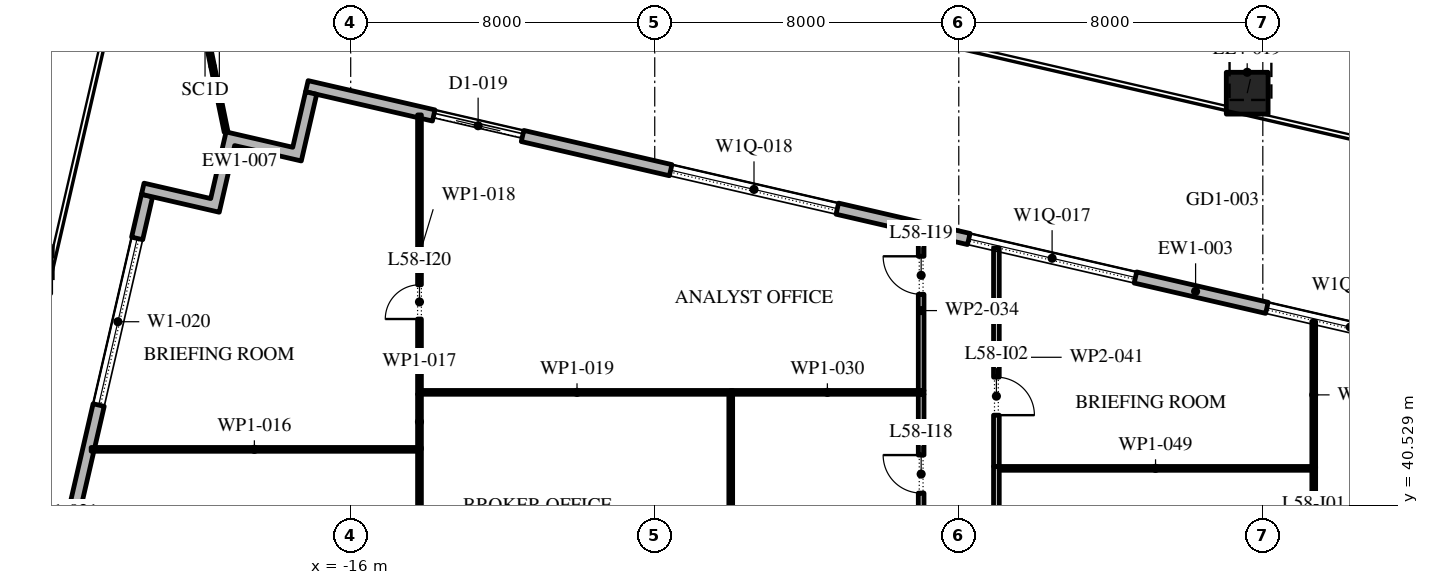
"""IFC4 building model, lengths in metres.
Left out: names, types, materials, properties, quantities, classifications, styles, units other than length and angle.
Written with IfcOpenShell. Run it as: python <this file> out.ifc"""

import sys

from ifc_helpers import new_model, si_unit, direction, frame, frame_2d, origin, origin_2d, place, context, subcontext, project, spatial, polyline, rectangle, outline, extrude, element, fill, save


model = new_model("IFC4")
c1 = context("Model", 3, precision=1e-05, world=origin(), true_north=direction((0.0, 1.0)))
c2 = subcontext(c1, "Body", "Model", "MODEL_VIEW")
j1 = project(units=[si_unit("LENGTHUNIT", "METRE"), si_unit("PLANEANGLEUNIT", "RADIAN")], contexts=[c1])
p1 = place(None, origin())
s1 = spatial("IfcSite", under=j1, at=p1, CompositionType="ELEMENT")
p2 = place(p1, origin())
s2 = spatial("IfcBuilding", under=s1, at=p2, CompositionType="ELEMENT")
p3 = place(p2, frame((0.0, 0.0, 268.2)))
s3 = spatial("IfcBuildingStorey", under=s2, at=p3, CompositionType="ELEMENT", Elevation=268.2)
p4 = place(p3, frame((7.589, 51.372, 0.0), z_axis=(0.020319626563, 0.088225387128, 0.995893264282), x_axis=(-0.974488096918, 0.224439187676, 0.0)))
e1 = element("IfcColumn", 1, at=p4, inside=s3, PredefinedType="COLUMN", context=c2, shape_type="SweptSolid", body=[
    extrude(rectangle(XDim=1.1, YDim=1.1, at=origin_2d()), origin(), (0.0, 0.0, 1.0), 4.217),
])
p5 = place(p3, frame((-24.444, 46.651, 0.0), z_axis=(0.017502025619, 0.075687567741, 0.996977969259), x_axis=(-0.974290512438, 0.225295355862, 0.0)))
e2 = element("IfcColumn", 2, at=p5, inside=s3, PredefinedType="COLUMN", context=c2, shape_type="SweptSolid", body=[
    extrude(rectangle(XDim=1.1, YDim=1.1, at=origin_2d()), origin(), (0.0, 0.0, 1.0), 4.213),
])
p6 = place(p3, frame((29.616, 40.758, 0.0), z_axis=(0.0, 0.0, 1.0), x_axis=(-0.974370532314, 0.224949029246, 0.0)))
e3 = element("IfcWall", 3, at=p6, inside=s3, PredefinedType="STANDARD", context=c2, shape_type="SweptSolid", body=[
    extrude(rectangle(XDim=48.0, YDim=0.3, at=frame_2d((24.0, 0.0))), origin(), (0.0, 0.0, 1.0), 4.0),
])
p7 = place(p6, frame((1.625, 0.0, 0.45)))
e4 = element("IfcOpeningElement", 4, at=p7, cuts=e3, PredefinedType="OPENING", context=c2, shape_type="SweptSolid", body=[
    extrude(rectangle(XDim=4.5, YDim=2.575, at=frame_2d((2.25, 1.288))), frame((0.0, 0.16, 0.0), z_axis=(0.0, -1.0, 0.0), x_axis=(1.0, 0.0, 0.0)), (0.0, 0.0, 1.0), 0.32),
])
p8 = place(p6, frame((10.575, 0.0, 0.0)))
e5 = element("IfcOpeningElement", 5, at=p8, cuts=e3, PredefinedType="OPENING", context=c2, shape_type="SweptSolid", body=[
    extrude(rectangle(XDim=2.4, YDim=3.5, at=frame_2d((1.2, 1.75))), frame((0.0, 0.16, 0.0), z_axis=(0.0, -1.0, 0.0), x_axis=(1.0, 0.0, 0.0)), (0.0, 0.0, 1.0), 0.32),
])
p9 = place(p6, frame((17.575, 0.0, 0.45)))
e6 = element("IfcOpeningElement", 6, at=p9, cuts=e3, PredefinedType="OPENING", context=c2, shape_type="SweptSolid", body=[
    extrude(rectangle(XDim=4.5, YDim=2.45, at=frame_2d((2.25, 1.225))), frame((0.0, 0.16, 0.0), z_axis=(0.0, -1.0, 0.0), x_axis=(1.0, 0.0, 0.0)), (0.0, 0.0, 1.0), 0.32),
])
p10 = place(p6, frame((25.625, 0.0, 0.45)))
e7 = element("IfcOpeningElement", 7, at=p10, cuts=e3, PredefinedType="OPENING", context=c2, shape_type="SweptSolid", body=[
    extrude(rectangle(XDim=4.5, YDim=2.45, at=frame_2d((2.25, 1.225))), frame((0.0, 0.16, 0.0), z_axis=(0.0, -1.0, 0.0), x_axis=(1.0, 0.0, 0.0)), (0.0, 0.0, 1.0), 0.32),
])
p11 = place(p6, frame((33.675, 0.0, 0.45)))
e8 = element("IfcOpeningElement", 8, at=p11, cuts=e3, PredefinedType="OPENING", context=c2, shape_type="SweptSolid", body=[
    extrude(rectangle(XDim=4.5, YDim=2.45, at=frame_2d((2.25, 1.225))), frame((0.0, 0.16, 0.0), z_axis=(0.0, -1.0, 0.0), x_axis=(1.0, 0.0, 0.0)), (0.0, 0.0, 1.0), 0.32),
])
p12 = place(p6, frame((42.175, 0.0, 0.0)))
e9 = element("IfcOpeningElement", 9, at=p12, cuts=e3, PredefinedType="OPENING", context=c2, shape_type="SweptSolid", body=[
    extrude(rectangle(XDim=2.4, YDim=3.5, at=frame_2d((1.2, 1.75))), frame((0.0, 0.16, 0.0), z_axis=(0.0, -1.0, 0.0), x_axis=(1.0, 0.0, 0.0)), (0.0, 0.0, 1.0), 0.32),
])
p13 = place(p3, frame((-21.359, 48.678, 0.0), z_axis=(0.0, 0.0, 1.0), x_axis=(-0.224949198343, -0.974370493275, 0.0)))
e10 = element("IfcWall", 10, at=p13, inside=s3, PredefinedType="STANDARD", context=c2, shape_type="SweptSolid", body=[
    extrude(rectangle(XDim=49.5, YDim=0.3, at=frame_2d((24.75, 0.0))), origin(), (0.0, 0.0, 1.0), 4.0),
])
p14 = place(p13, frame((1.157, 0.0, 0.45)))
e11 = element("IfcOpeningElement", 11, at=p14, cuts=e10, PredefinedType="OPENING", context=c2, shape_type="SweptSolid", body=[
    extrude(rectangle(XDim=4.5, YDim=3.05, at=frame_2d((2.25, 1.525))), frame((0.0, 0.16, 0.0), z_axis=(0.0, -1.0, 0.0), x_axis=(1.0, 0.0, 0.0)), (0.0, 0.0, 1.0), 0.32),
])
p15 = place(p13, frame((9.171, 0.0, 0.0)))
e12 = element("IfcOpeningElement", 12, at=p15, cuts=e10, PredefinedType="OPENING", context=c2, shape_type="SweptSolid", body=[
    extrude(rectangle(XDim=2.4, YDim=3.5, at=frame_2d((1.2, 1.75))), frame((0.0, 0.16, 0.0), z_axis=(0.0, -1.0, 0.0), x_axis=(1.0, 0.0, 0.0)), (0.0, 0.0, 1.0), 0.32),
])
p16 = place(p13, frame((15.236, 0.0, 0.45)))
e13 = element("IfcOpeningElement", 13, at=p16, cuts=e10, PredefinedType="OPENING", context=c2, shape_type="SweptSolid", body=[
    extrude(rectangle(XDim=4.5, YDim=3.05, at=frame_2d((2.25, 1.525))), frame((0.0, 0.16, 0.0), z_axis=(0.0, -1.0, 0.0), x_axis=(1.0, 0.0, 0.0)), (0.0, 0.0, 1.0), 0.32),
])
p17 = place(p13, frame((22.35, 0.0, 0.45)))
e14 = element("IfcOpeningElement", 14, at=p17, cuts=e10, PredefinedType="OPENING", context=c2, shape_type="SweptSolid", body=[
    extrude(rectangle(XDim=4.5, YDim=3.05, at=frame_2d((2.25, 1.525))), frame((0.0, 0.16, 0.0), z_axis=(0.0, -1.0, 0.0), x_axis=(1.0, 0.0, 0.0)), (0.0, 0.0, 1.0), 0.32),
])
p18 = place(p13, frame((29.464, 0.0, 0.45)))
e15 = element("IfcOpeningElement", 15, at=p18, cuts=e10, PredefinedType="OPENING", context=c2, shape_type="SweptSolid", body=[
    extrude(rectangle(XDim=4.5, YDim=3.05, at=frame_2d((2.25, 1.525))), frame((0.0, 0.16, 0.0), z_axis=(0.0, -1.0, 0.0), x_axis=(1.0, 0.0, 0.0)), (0.0, 0.0, 1.0), 0.32),
])
p19 = place(p13, frame((37.628, 0.0, 0.0)))
e16 = element("IfcOpeningElement", 16, at=p19, cuts=e10, PredefinedType="OPENING", context=c2, shape_type="SweptSolid", body=[
    extrude(rectangle(XDim=2.4, YDim=3.325, at=frame_2d((1.2, 1.663))), frame((0.0, 0.16, 0.0), z_axis=(0.0, -1.0, 0.0), x_axis=(1.0, 0.0, 0.0)), (0.0, 0.0, 1.0), 0.32),
])
p20 = place(p13, frame((43.693, 0.0, 0.45)))
e17 = element("IfcOpeningElement", 17, at=p20, cuts=e10, PredefinedType="OPENING", context=c2, shape_type="SweptSolid", body=[
    extrude(rectangle(XDim=4.5, YDim=2.825, at=frame_2d((2.25, 1.413))), frame((0.0, 0.16, 0.0), z_axis=(0.0, -1.0, 0.0), x_axis=(1.0, 0.0, 0.0)), (0.0, 0.0, 1.0), 0.32),
])
p21 = place(p3, origin())
e18 = element("IfcWall", 18, at=p21, inside=s3, PredefinedType="STANDARD", context=c2, shape_type="SweptSolid", body=[
    extrude(outline(polyline([(-21.505, 48.712), (-21.438, 49.004), (-19.684, 48.599), (-19.279, 50.353), (-17.525, 49.948), (-17.188, 51.41), (-16.895, 51.342), (-17.3, 49.588), (-19.054, 49.993), (-19.459, 48.24), (-21.505, 48.712)])), origin(), (0.0, 0.0, 1.0), 4.0),
])
p22 = place(p3, frame((-19.279, 50.353, -0.05), z_axis=(0.0, 0.0, 1.0), x_axis=(-0.201469164347, 0.979494857474, 0.0)))
e19 = element("IfcWall", 19, at=p22, inside=s3, PredefinedType="STANDARD", context=c2, shape_type="SweptSolid", body=[
    extrude(rectangle(XDim=1.762, YDim=0.1, at=frame_2d((0.881, 0.0))), origin(), (0.0, 0.0, 1.0), 4.05),
])
p23 = place(p3, frame((-14.19, 36.55, 0.0), z_axis=(0.0, 0.0, 1.0), x_axis=(0.0, 1.0, 0.0)))
e20 = element("IfcWall", 20, at=p23, inside=s3, PredefinedType="PARTITIONING", context=c2, shape_type="SweptSolid", body=[
    extrude(rectangle(XDim=5.5, YDim=0.1, at=frame_2d((2.75, 0.0))), origin(), (0.0, 0.0, 1.0), 4.0),
])
p24 = place(p3, frame((-14.24, 42.0, 0.0), z_axis=(0.0, 0.0, 1.0), x_axis=(-1.0, 0.0, 0.0)))
e21 = element("IfcWall", 21, at=p24, inside=s3, PredefinedType="PARTITIONING", context=c2, shape_type="SweptSolid", body=[
    extrude(rectangle(XDim=8.589, YDim=0.1, at=frame_2d((4.294, 0.0))), origin(), (0.0, 0.0, 1.0), 4.0),
])
p25 = place(p3, frame((-14.19, 42.0, 0.0), z_axis=(0.0, 0.0, 1.0), x_axis=(0.0, 1.0, 0.0)))
e22 = element("IfcWall", 22, at=p25, inside=s3, PredefinedType="PARTITIONING", context=c2, shape_type="SweptSolid", body=[
    extrude(rectangle(XDim=1.45, YDim=0.1, at=frame_2d((0.725, 0.0))), origin(), (0.0, 0.0, 1.0), 4.0),
])
p26 = place(p3, frame((-14.19, 43.45, 0.0), z_axis=(0.0, 0.0, 1.0), x_axis=(0.0, 1.0, 0.0)))
e23 = element("IfcWall", 23, at=p26, inside=s3, PredefinedType="PARTITIONING", context=c2, shape_type="SweptSolid", body=[
    extrude(rectangle(XDim=7.35, YDim=0.1, at=frame_2d((3.675, 0.0))), origin(), (0.0, 0.0, 1.0), 4.0),
])
p27 = place(p26, frame((1.98, 0.0, 0.0)))
e24 = element("IfcOpeningElement", 24, at=p27, cuts=e23, PredefinedType="OPENING", context=c2, shape_type="SweptSolid", body=[
    extrude(rectangle(XDim=0.9, YDim=2.1, at=frame_2d((0.45, 1.05))), frame((0.0, 0.06, 0.0), z_axis=(0.0, -1.0, 0.0), x_axis=(1.0, 0.0, 0.0)), (0.0, 0.0, 1.0), 0.12),
])
p28 = place(p3, frame((-14.14, 43.5, 0.0), z_axis=(0.0, 0.0, 1.0), x_axis=(1.0, 0.0, 0.0)))
e25 = element("IfcWall", 25, at=p28, inside=s3, PredefinedType="PARTITIONING", context=c2, shape_type="SweptSolid", body=[
    extrude(rectangle(XDim=8.19, YDim=0.1, at=frame_2d((4.095, 0.0))), origin(), (0.0, 0.0, 1.0), 4.0),
])
p29 = place(p3, frame((-6.0, 43.45, 0.0), z_axis=(0.0, 0.0, 1.0), x_axis=(0.0, -1.0, 0.0)))
e26 = element("IfcWall", 26, at=p29, inside=s3, PredefinedType="PARTITIONING", context=c2, shape_type="SweptSolid", body=[
    extrude(rectangle(XDim=6.9, YDim=0.1, at=frame_2d((3.45, 0.0))), origin(), (0.0, 0.0, 1.0), 4.0),
])
p30 = place(p3, frame((-6.0, 43.5, 0.0), z_axis=(0.0, 0.0, 1.0), x_axis=(1.0, 0.0, 0.0)))
e27 = element("IfcWall", 27, at=p30, inside=s3, PredefinedType="PARTITIONING", context=c2, shape_type="SweptSolid", body=[
    extrude(rectangle(XDim=5.085, YDim=0.1, at=frame_2d((2.542, 0.0))), origin(), (0.0, 0.0, 1.0), 4.0),
])
p31 = place(p3, frame((-0.99, 36.55, 0.0), z_axis=(0.0, 0.0, 1.0), x_axis=(0.0, 1.0, 0.0)))
e28 = element("IfcWall", 28, at=p31, inside=s3, PredefinedType="PARTITIONING", context=c2, shape_type="SweptSolid", body=[
    extrude(rectangle(XDim=6.9, YDim=0.15, at=frame_2d((3.45, 0.0))), origin(), (0.0, 0.0, 1.0), 4.0),
])
p32 = place(p31, frame((4.3, 0.0, 0.0)))
e29 = element("IfcOpeningElement", 29, at=p32, cuts=e28, PredefinedType="OPENING", context=c2, shape_type="SweptSolid", body=[
    extrude(rectangle(XDim=1.0, YDim=2.1, at=frame_2d((0.5, 1.05))), frame((0.0, 0.085, 0.0), z_axis=(0.0, -1.0, 0.0), x_axis=(1.0, 0.0, 0.0)), (0.0, 0.0, 1.0), 0.17),
])
p33 = place(p3, frame((-0.99, 43.55, 0.0), z_axis=(0.0, 0.0, 1.0), x_axis=(0.0, 1.0, 0.0)))
e30 = element("IfcWall", 30, at=p33, inside=s3, PredefinedType="PARTITIONING", context=c2, shape_type="SweptSolid", body=[
    extrude(rectangle(XDim=4.203, YDim=0.15, at=frame_2d((2.102, 0.0))), origin(), (0.0, 0.0, 1.0), 4.0),
])
p34 = place(p33, frame((2.53, 0.0, 0.0)))
e31 = element("IfcOpeningElement", 31, at=p34, cuts=e30, PredefinedType="OPENING", context=c2, shape_type="SweptSolid", body=[
    extrude(rectangle(XDim=1.0, YDim=2.1, at=frame_2d((0.5, 1.05))), frame((0.0, 0.085, 0.0), z_axis=(0.0, -1.0, 0.0), x_axis=(1.0, 0.0, 0.0)), (0.0, 0.0, 1.0), 0.17),
])
p35 = place(p3, frame((0.99, 41.55, 0.0), z_axis=(0.0, 0.0, 1.0), x_axis=(0.0, -1.0, 0.0)))
e32 = element("IfcWall", 32, at=p35, inside=s3, PredefinedType="PARTITIONING", context=c2, shape_type="SweptSolid", body=[
    extrude(rectangle(XDim=6.43, YDim=0.15, at=frame_2d((3.215, 0.0))), origin(), (0.0, 0.0, 1.0), 4.0),
])
p36 = place(p35, frame((4.08, 0.0, 0.0)))
e33 = element("IfcOpeningElement", 33, at=p36, cuts=e32, PredefinedType="OPENING", context=c2, shape_type="SweptSolid", body=[
    extrude(rectangle(XDim=1.0, YDim=2.1, at=frame_2d((0.5, 1.05))), frame((0.0, 0.085, 0.0), z_axis=(0.0, -1.0, 0.0), x_axis=(1.0, 0.0, 0.0)), (0.0, 0.0, 1.0), 0.17),
])
p37 = place(p3, frame((0.99, 47.296, 0.0), z_axis=(0.0, 0.0, 1.0), x_axis=(0.0, -1.0, 0.0)))
e34 = element("IfcWall", 34, at=p37, inside=s3, PredefinedType="PARTITIONING", context=c2, shape_type="SweptSolid", body=[
    extrude(rectangle(XDim=5.746, YDim=0.15, at=frame_2d((2.873, 0.0))), origin(), (0.0, 0.0, 1.0), 4.0),
])
p38 = place(p37, frame((3.396, 0.0, 0.0)))
e35 = element("IfcOpeningElement", 35, at=p38, cuts=e34, PredefinedType="OPENING", context=c2, shape_type="SweptSolid", body=[
    extrude(rectangle(XDim=1.0, YDim=2.1, at=frame_2d((0.5, 1.05))), frame((0.0, 0.085, 0.0), z_axis=(0.0, -1.0, 0.0), x_axis=(1.0, 0.0, 0.0)), (0.0, 0.0, 1.0), 0.17),
])
p39 = place(p3, frame((9.34, 35.12, 0.0), z_axis=(0.0, 0.0, 1.0), x_axis=(0.0, 1.0, 0.0)))
e36 = element("IfcWall", 36, at=p39, inside=s3, PredefinedType="PARTITIONING", context=c2, shape_type="SweptSolid", body=[
    extrude(rectangle(XDim=6.43, YDim=0.1, at=frame_2d((3.215, 0.0))), origin(), (0.0, 0.0, 1.0), 4.0),
])
p40 = place(p39, frame((3.9, 0.0, 0.0)))
e37 = element("IfcOpeningElement", 37, at=p40, cuts=e36, PredefinedType="OPENING", context=c2, shape_type="SweptSolid", body=[
    extrude(rectangle(XDim=0.9, YDim=2.1, at=frame_2d((0.45, 1.05))), frame((0.0, 0.06, 0.0), z_axis=(0.0, -1.0, 0.0), x_axis=(1.0, 0.0, 0.0)), (0.0, 0.0, 1.0), 0.12),
])
p41 = place(p3, frame((9.29, 41.5, 0.0), z_axis=(0.0, 0.0, 1.0), x_axis=(-1.0, 0.0, 0.0)))
e38 = element("IfcWall", 38, at=p41, inside=s3, PredefinedType="PARTITIONING", context=c2, shape_type="SweptSolid", body=[
    extrude(rectangle(XDim=8.225, YDim=0.1, at=frame_2d((4.113, 0.0))), origin(), (0.0, 0.0, 1.0), 4.0),
])
p42 = place(p3, frame((9.34, 41.5, 0.0), z_axis=(0.0, 0.0, 1.0), x_axis=(0.0, 1.0, 0.0)))
e39 = element("IfcWall", 39, at=p42, inside=s3, PredefinedType="PARTITIONING", context=c2, shape_type="SweptSolid", body=[
    extrude(rectangle(XDim=3.868, YDim=0.1, at=frame_2d((1.934, 0.0))), origin(), (0.0, 0.0, 1.0), 4.0),
])
p43 = place(p3, frame((-19.634, 52.079, -0.05), z_axis=(0.0, 0.0, 1.0), x_axis=(-0.201461112573, 0.979496513583, 0.0)))
e40 = element("IfcWall", 40, at=p43, inside=s3, PredefinedType="STANDARD", context=c2, shape_type="SweptSolid", body=[
    extrude(rectangle(XDim=1.975, YDim=0.1, at=frame_2d((0.988, 0.0))), origin(), (0.0, 0.0, 1.0), 3.07),
])
p44 = place(p9, origin())
e41 = element("IfcWindow", 41, at=p44, inside=s3, PartitioningType="DOUBLE_PANEL_VERTICAL", PredefinedType="WINDOW", context=c2, shape_type="SweptSolid", body=[
    extrude(rectangle(XDim=4.5, YDim=2.45, at=frame_2d((2.25, 1.225))), frame((0.0, 0.03, 0.0), z_axis=(0.0, -1.0, 0.0), x_axis=(1.0, 0.0, 0.0)), (0.0, 0.0, 1.0), 0.06),
])
fill(e6, e41)
p45 = place(p10, origin())
e42 = element("IfcWindow", 42, at=p45, inside=s3, PartitioningType="DOUBLE_PANEL_VERTICAL", PredefinedType="WINDOW", context=c2, shape_type="SweptSolid", body=[
    extrude(rectangle(XDim=4.5, YDim=2.45, at=frame_2d((2.25, 1.225))), frame((0.0, 0.03, 0.0), z_axis=(0.0, -1.0, 0.0), x_axis=(1.0, 0.0, 0.0)), (0.0, 0.0, 1.0), 0.06),
])
fill(e7, e42)
p46 = place(p11, origin())
e43 = element("IfcWindow", 43, at=p46, inside=s3, PartitioningType="DOUBLE_PANEL_VERTICAL", PredefinedType="WINDOW", context=c2, shape_type="SweptSolid", body=[
    extrude(rectangle(XDim=4.5, YDim=2.45, at=frame_2d((2.25, 1.225))), frame((0.0, 0.03, 0.0), z_axis=(0.0, -1.0, 0.0), x_axis=(1.0, 0.0, 0.0)), (0.0, 0.0, 1.0), 0.06),
])
fill(e8, e43)
p47 = place(p12, origin())
e44 = element("IfcDoor", 44, at=p47, inside=s3, OperationType="DOUBLE_DOOR_SLIDING", PredefinedType="DOOR", context=c2, shape_type="SweptSolid", body=[
    extrude(rectangle(XDim=2.4, YDim=3.5, at=frame_2d((1.2, 1.75))), frame((0.0, 0.025, 0.0), z_axis=(0.0, -1.0, 0.0), x_axis=(1.0, 0.0, 0.0)), (0.0, 0.0, 1.0), 0.05),
])
fill(e9, e44)
p48 = place(p14, origin())
e45 = element("IfcWindow", 45, at=p48, inside=s3, PartitioningType="DOUBLE_PANEL_VERTICAL", PredefinedType="WINDOW", context=c2, shape_type="SweptSolid", body=[
    extrude(rectangle(XDim=4.5, YDim=3.05, at=frame_2d((2.25, 1.525))), frame((0.0, 0.03, 0.0), z_axis=(0.0, -1.0, 0.0), x_axis=(1.0, 0.0, 0.0)), (0.0, 0.0, 1.0), 0.06),
])
fill(e11, e45)
p49 = place(p38, origin())
e46 = element("IfcDoor", 46, at=p49, inside=s3, OperationType="SINGLE_SWING_LEFT", PredefinedType="DOOR", context=c2, shape_type="SweptSolid", body=[
    extrude(rectangle(XDim=1.0, YDim=2.1, at=frame_2d((0.5, 1.05))), frame((0.0, 0.025, 0.0), z_axis=(0.0, -1.0, 0.0), x_axis=(1.0, 0.0, 0.0)), (0.0, 0.0, 1.0), 0.05),
])
fill(e35, e46)
p50 = place(p32, origin())
e47 = element("IfcDoor", 47, at=p50, inside=s3, OperationType="SINGLE_SWING_LEFT", PredefinedType="DOOR", context=c2, shape_type="SweptSolid", body=[
    extrude(rectangle(XDim=1.0, YDim=2.1, at=frame_2d((0.5, 1.05))), frame((0.0, 0.025, 0.0), z_axis=(0.0, -1.0, 0.0), x_axis=(1.0, 0.0, 0.0)), (0.0, 0.0, 1.0), 0.05),
])
fill(e29, e47)
p51 = place(p34, origin())
e48 = element("IfcDoor", 48, at=p51, inside=s3, OperationType="SINGLE_SWING_LEFT", PredefinedType="DOOR", context=c2, shape_type="SweptSolid", body=[
    extrude(rectangle(XDim=1.0, YDim=2.1, at=frame_2d((0.5, 1.05))), frame((0.0, 0.025, 0.0), z_axis=(0.0, -1.0, 0.0), x_axis=(1.0, 0.0, 0.0)), (0.0, 0.0, 1.0), 0.05),
])
fill(e31, e48)
p52 = place(p27, origin())
e49 = element("IfcDoor", 49, at=p52, inside=s3, OperationType="SINGLE_SWING_RIGHT", PredefinedType="DOOR", context=c2, shape_type="SweptSolid", body=[
    extrude(rectangle(XDim=0.9, YDim=2.1, at=frame_2d((0.45, 1.05))), frame((0.0, 0.025, 0.0), z_axis=(0.0, -1.0, 0.0), x_axis=(1.0, 0.0, 0.0)), (0.0, 0.0, 1.0), 0.05),
])
fill(e24, e49)
save(model, sys.argv[1])
